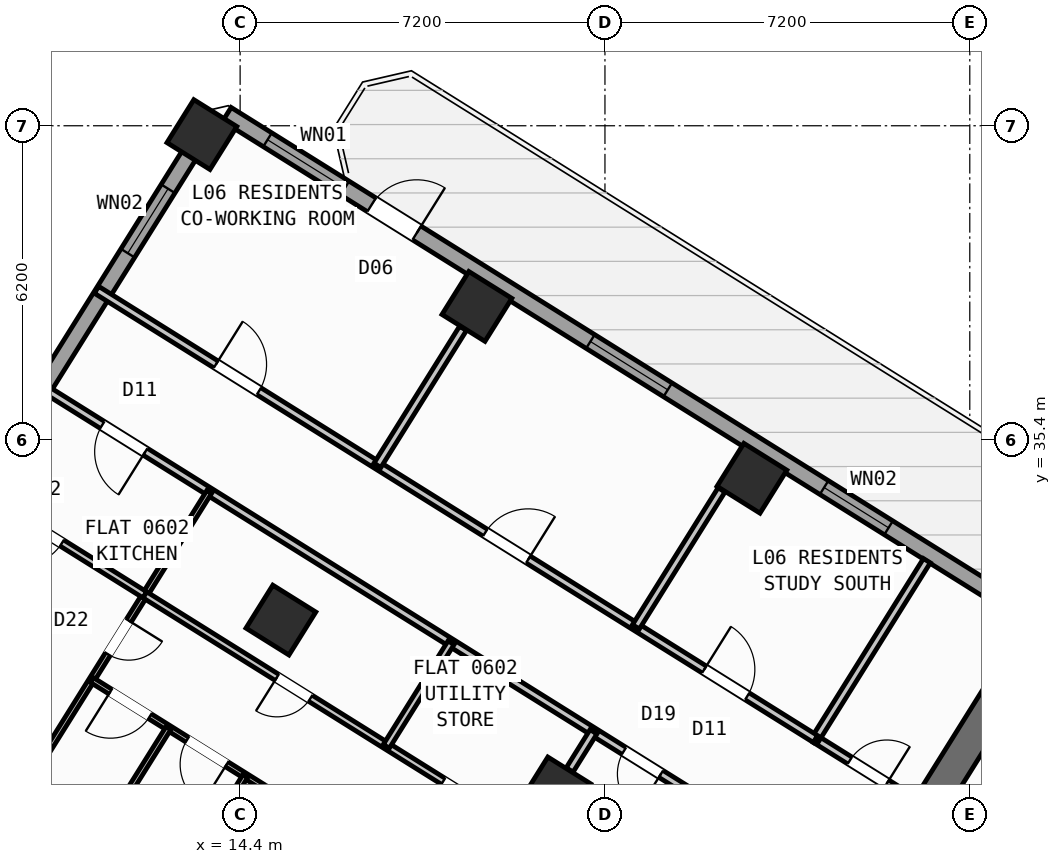
"""IFC4 building model, lengths in metres.
Left out: names, types, materials, properties, quantities, classifications, styles, units other than length and angle.
Written with IfcOpenShell. Run it as: python <this file> out.ifc"""

import sys

from ifc_helpers import new_model, si_unit, direction, frame, frame_2d, origin, origin_2d, place, context, subcontext, project, spatial, rectangle, hollow_rectangle, extrude, source, transform, mapped, element, fill, save


model = new_model("IFC4")
c1 = context("Model", 3, precision=1e-05, world=origin(), true_north=direction((0.0, 1.0)))
c2 = subcontext(c1, "Body", "Model", "MODEL_VIEW")
j1 = project(units=[si_unit("LENGTHUNIT", "METRE"), si_unit("PLANEANGLEUNIT", "RADIAN")], contexts=[c1])
p1 = place(None, origin())
s1 = spatial("IfcSite", under=j1, at=p1, CompositionType="ELEMENT")
p2 = place(p1, origin())
s2 = spatial("IfcBuilding", under=s1, at=p2, CompositionType="ELEMENT")
p3 = place(p2, frame((0.0, 0.0, 27.6)))
s3 = spatial("IfcBuildingStorey", under=s2, at=p3, CompositionType="ELEMENT", Elevation=27.6)
p4 = place(p3, frame((29.491, 30.552, 0.0), z_axis=(0.0, 0.0, 1.0), x_axis=(-0.529893103397, -0.8480644427, 0.0)))
e1 = element("IfcWall", 1, at=p4, inside=s3, PredefinedType="SHEAR", context=c2, shape_type="SweptSolid", body=[
    extrude(rectangle(XDim=3.525, YDim=0.65, at=frame_2d((1.763, 0.0))), origin(), (0.0, 0.0, 1.0), 3.35),
])
m1 = source(origin(), c2, "Body", "SweptSolid", [
    extrude(hollow_rectangle(XDim=1.0, YDim=1.0, WallThickness=0.04, at=origin_2d()), origin(), (0.0, 0.0, 1.0), 3.6),
])
for number, where, z_axis, x_axis in (
    (2, (24.5, 34.643, 0.0), (0.0, 0.0, 1.0), (-0.848, 0.53, 0.0)),
    (3, (20.632, 28.452, 0.0), (0.0, 0.0, 1.0), (-0.848, 0.53, 0.0)),
    (4, (19.073, 38.034, 0.0), (0.0, 0.0, 1.0), (-0.848, 0.53, 0.0)),
    (5, (15.205, 31.844, 0.0), (0.0, 0.0, 1.0), (-0.848, 0.53, 0.0)),
    (6, (13.646, 41.426, 0.0), (0.0, 0.0, 1.0), (-0.848, 0.53, 0.0)),
):
    element("IfcColumn", number, at=place(p3, frame(where, z_axis=z_axis, x_axis=x_axis)), inside=s3, PredefinedType="COLUMN", context=c2, shape_type="MappedRepresentation", body=[
        mapped(m1, transform((0.0, 0.0, 0.0), scale=1.0)),
    ])
p5 = place(p3, frame((2.415, 23.452, 0.0), z_axis=(0.0, 0.0, 1.0), x_axis=(0.52991049553, 0.848053575387, 0.0)))
e7 = element("IfcWall", 7, at=p5, inside=s3, PredefinedType="STANDARD", context=c2, shape_type="SweptSolid", body=[
    extrude(rectangle(XDim=21.587, YDim=0.32, at=frame_2d((10.794, 0.0))), origin(), (0.0, 0.0, 1.0), 2.725),
])
p6 = place(p5, frame((2.356, 0.0, 0.8)))
e8 = element("IfcOpeningElement", 8, at=p6, cuts=e7, PredefinedType="OPENING", context=c2, shape_type="SweptSolid", body=[
    extrude(rectangle(XDim=2.1, YDim=1.55, at=frame_2d((1.05, 0.775))), frame((0.0, 0.17, 0.0), z_axis=(0.0, -1.0, 0.0), x_axis=(1.0, 0.0, 0.0)), (0.0, 0.0, 1.0), 0.34),
])
p7 = place(p5, frame((9.009, 0.0, 0.85)))
e9 = element("IfcOpeningElement", 9, at=p7, cuts=e7, PredefinedType="OPENING", context=c2, shape_type="SweptSolid", body=[
    extrude(rectangle(XDim=1.8, YDim=1.5, at=frame_2d((0.9, 0.75))), frame((0.0, 0.17, 0.0), z_axis=(0.0, -1.0, 0.0), x_axis=(1.0, 0.0, 0.0)), (0.0, 0.0, 1.0), 0.34),
])
p8 = place(p5, frame((18.434, 0.0, 0.85)))
e10 = element("IfcOpeningElement", 10, at=p8, cuts=e7, PredefinedType="OPENING", context=c2, shape_type="SweptSolid", body=[
    extrude(rectangle(XDim=1.5, YDim=1.5, at=frame_2d((0.75, 0.75))), frame((0.0, 0.17, 0.0), z_axis=(0.0, -1.0, 0.0), x_axis=(1.0, 0.0, 0.0)), (0.0, 0.0, 1.0), 0.34),
])
p9 = place(p3, frame((14.138, 41.825, 0.0), z_axis=(0.0, 0.0, 1.0), x_axis=(0.848046498049, -0.529921821731, 0.0)))
e11 = element("IfcWall", 11, at=p9, inside=s3, PredefinedType="STANDARD", context=c2, shape_type="SweptSolid", body=[
    extrude(rectangle(XDim=31.588, YDim=0.32, at=frame_2d((15.794, 0.0))), origin(), (0.0, 0.0, 1.0), 3.35),
])
p10 = place(p9, frame((3.369, 0.0, 0.0)))
e12 = element("IfcOpeningElement", 12, at=p10, cuts=e11, PredefinedType="OPENING", context=c2, shape_type="SweptSolid", body=[
    extrude(rectangle(XDim=1.05, YDim=2.15, at=frame_2d((0.525, 1.075))), frame((0.0, 0.17, 0.0), z_axis=(0.0, -1.0, 0.0), x_axis=(1.0, 0.0, 0.0)), (0.0, 0.0, 1.0), 0.34),
])
p11 = place(p9, frame((0.946, 0.0, 0.85)))
e13 = element("IfcOpeningElement", 13, at=p11, cuts=e11, PredefinedType="OPENING", context=c2, shape_type="SweptSolid", body=[
    extrude(rectangle(XDim=1.8, YDim=1.5, at=frame_2d((0.9, 0.75))), frame((0.0, 0.17, 0.0), z_axis=(0.0, -1.0, 0.0), x_axis=(1.0, 0.0, 0.0)), (0.0, 0.0, 1.0), 0.34),
])
p12 = place(p9, frame((8.46, 0.0, 0.85)))
e14 = element("IfcOpeningElement", 14, at=p12, cuts=e11, PredefinedType="OPENING", context=c2, shape_type="SweptSolid", body=[
    extrude(rectangle(XDim=1.8, YDim=1.5, at=frame_2d((0.9, 0.75))), frame((0.0, 0.17, 0.0), z_axis=(0.0, -1.0, 0.0), x_axis=(1.0, 0.0, 0.0)), (0.0, 0.0, 1.0), 0.34),
])
p13 = place(p9, frame((13.899, 0.0, 0.85)))
e15 = element("IfcOpeningElement", 15, at=p13, cuts=e11, PredefinedType="OPENING", context=c2, shape_type="SweptSolid", body=[
    extrude(rectangle(XDim=1.5, YDim=1.5, at=frame_2d((0.75, 0.75))), frame((0.0, 0.17, 0.0), z_axis=(0.0, -1.0, 0.0), x_axis=(1.0, 0.0, 0.0)), (0.0, 0.0, 1.0), 0.34),
])
p14 = place(p9, frame((22.019, 0.0, 0.95)))
e16 = element("IfcOpeningElement", 16, at=p14, cuts=e11, PredefinedType="OPENING", context=c2, shape_type="SweptSolid", body=[
    extrude(rectangle(XDim=1.2, YDim=1.4, at=frame_2d((0.6, 0.7))), frame((0.0, 0.17, 0.0), z_axis=(0.0, -1.0, 0.0), x_axis=(1.0, 0.0, 0.0)), (0.0, 0.0, 1.0), 0.34),
])
p15 = place(p9, frame((27.569, 0.0, 0.95)))
e17 = element("IfcOpeningElement", 17, at=p15, cuts=e11, PredefinedType="OPENING", context=c2, shape_type="SweptSolid", body=[
    extrude(rectangle(XDim=1.2, YDim=1.4, at=frame_2d((0.6, 0.7))), frame((0.0, 0.17, 0.0), z_axis=(0.0, -1.0, 0.0), x_axis=(1.0, 0.0, 0.0)), (0.0, 0.0, 1.0), 0.34),
])
p16 = place(p3, frame((27.669, 28.3, 0.0), z_axis=(0.0, 0.0, 1.0), x_axis=(-0.848040823168, 0.52993090327, 0.0)))
e18 = element("IfcWall", 18, at=p16, inside=s3, PredefinedType="PARTITIONING", context=c2, shape_type="SweptSolid", body=[
    extrude(rectangle(XDim=2.258, YDim=0.16, at=frame_2d((1.129, 0.0))), origin(), (0.0, 0.0, 1.0), 3.34),
])
p17 = place(p16, frame((0.598, 0.0, 0.0)))
e19 = element("IfcOpeningElement", 19, at=p17, cuts=e18, PredefinedType="OPENING", context=c2, shape_type="SweptSolid", body=[
    extrude(rectangle(XDim=0.86, YDim=2.05, at=frame_2d((0.43, 1.025))), frame((0.0, 0.09, 0.0), z_axis=(0.0, -1.0, 0.0), x_axis=(1.0, 0.0, 0.0)), (0.0, 0.0, 1.0), 0.18),
])
p18 = place(p3, frame((27.953, 33.016, 0.0), z_axis=(0.0, 0.0, 1.0), x_axis=(-0.529872022255, -0.848077614391, 0.0)))
e20 = element("IfcWall", 20, at=p18, inside=s3, PredefinedType="PARTITIONING", context=c2, shape_type="SweptSolid", body=[
    extrude(rectangle(XDim=4.15, YDim=0.16, at=frame_2d((2.075, 0.0))), origin(), (0.0, 0.0, 1.0), 3.34),
])
p19 = place(p3, frame((25.754, 29.497, 0.0), z_axis=(0.0, 0.0, 1.0), x_axis=(-0.848045850158, 0.529922858565, 0.0)))
e21 = element("IfcWall", 21, at=p19, inside=s3, PredefinedType="PARTITIONING", context=c2, shape_type="SweptSolid", body=[
    extrude(rectangle(XDim=16.73, YDim=0.16, at=frame_2d((8.365, 0.0))), origin(), (0.0, 0.0, 1.0), 3.34),
])
p20 = place(p19, frame((1.588, 0.0, 0.0)))
e22 = element("IfcOpeningElement", 22, at=p20, cuts=e21, PredefinedType="OPENING", context=c2, shape_type="SweptSolid", body=[
    extrude(rectangle(XDim=1.0, YDim=2.1, at=frame_2d((0.5, 1.05))), frame((0.0, 0.09, 0.0), z_axis=(0.0, -1.0, 0.0), x_axis=(1.0, 0.0, 0.0)), (0.0, 0.0, 1.0), 0.18),
])
p21 = place(p19, frame((6.685, 0.0, 0.0)))
e23 = element("IfcOpeningElement", 23, at=p21, cuts=e21, PredefinedType="OPENING", context=c2, shape_type="SweptSolid", body=[
    extrude(rectangle(XDim=1.0, YDim=2.1, at=frame_2d((0.5, 1.05))), frame((0.0, 0.09, 0.0), z_axis=(0.0, -1.0, 0.0), x_axis=(1.0, 0.0, 0.0)), (0.0, 0.0, 1.0), 0.18),
])
p22 = place(p19, frame((12.951, 0.0, 0.0)))
e24 = element("IfcOpeningElement", 24, at=p22, cuts=e21, PredefinedType="OPENING", context=c2, shape_type="SweptSolid", body=[
    extrude(rectangle(XDim=1.0, YDim=2.1, at=frame_2d((0.5, 1.05))), frame((0.0, 0.09, 0.0), z_axis=(0.0, -1.0, 0.0), x_axis=(1.0, 0.0, 0.0)), (0.0, 0.0, 1.0), 0.18),
])
p23 = place(p3, frame((24.588, 27.631, 0.0), z_axis=(0.0, 0.0, 1.0), x_axis=(-0.848041752158, 0.529929416617, 0.0)))
e25 = element("IfcWall", 25, at=p23, inside=s3, PredefinedType="PARTITIONING", context=c2, shape_type="SweptSolid", body=[
    extrude(rectangle(XDim=16.73, YDim=0.16, at=frame_2d((8.365, 0.0))), origin(), (0.0, 0.0, 1.0), 3.34),
])
p24 = place(p23, frame((2.22, 0.0, 0.0)))
e26 = element("IfcOpeningElement", 26, at=p24, cuts=e25, PredefinedType="OPENING", context=c2, shape_type="SweptSolid", body=[
    extrude(rectangle(XDim=0.86, YDim=2.05, at=frame_2d((0.43, 1.025))), frame((0.0, 0.09, 0.0), z_axis=(0.0, -1.0, 0.0), x_axis=(1.0, 0.0, 0.0)), (0.0, 0.0, 1.0), 0.18),
])
p25 = place(p23, frame((14.22, 0.0, 0.0)))
e27 = element("IfcOpeningElement", 27, at=p25, cuts=e25, PredefinedType="OPENING", context=c2, shape_type="SweptSolid", body=[
    extrude(rectangle(XDim=1.0, YDim=2.1, at=frame_2d((0.5, 1.05))), frame((0.0, 0.09, 0.0), z_axis=(0.0, -1.0, 0.0), x_axis=(1.0, 0.0, 0.0)), (0.0, 0.0, 1.0), 0.18),
])
p26 = place(p3, frame((21.374, 29.639, 0.0), z_axis=(0.0, 0.0, 1.0), x_axis=(-0.529974231203, -0.848013746505, 0.0)))
e28 = element("IfcWall", 28, at=p26, inside=s3, PredefinedType="PARTITIONING", context=c2, shape_type="SweptSolid", body=[
    extrude(rectangle(XDim=0.888, YDim=0.16, at=frame_2d((0.444, 0.0))), origin(), (0.0, 0.0, 1.0), 2.725),
])
p27 = place(p3, frame((13.792, 34.377, 0.0), z_axis=(0.0, 0.0, 1.0), x_axis=(-0.529924475241, -0.848044839935, 0.0)))
e29 = element("IfcWall", 29, at=p27, inside=s3, PredefinedType="PARTITIONING", context=c2, shape_type="SweptSolid", body=[
    extrude(rectangle(XDim=15.62, YDim=0.11, at=frame_2d((7.81, 0.0))), origin(), (0.0, 0.0, 1.0), 3.34),
])
p28 = place(p27, frame((3.0, 0.0, 0.0)))
e30 = element("IfcOpeningElement", 30, at=p28, cuts=e29, PredefinedType="OPENING", context=c2, shape_type="SweptSolid", body=[
    extrude(rectangle(XDim=0.78, YDim=2.05, at=frame_2d((0.39, 1.025))), frame((0.0, 0.065, 0.0), z_axis=(0.0, -1.0, 0.0), x_axis=(1.0, 0.0, 0.0)), (0.0, 0.0, 1.0), 0.13),
])
p29 = place(p3, frame((12.521, 32.342, 0.0), z_axis=(0.0, 0.0, 1.0), x_axis=(-0.848043100782, 0.52992725842, 0.0)))
e31 = element("IfcWall", 31, at=p29, inside=s3, PredefinedType="PLUMBINGWALL", context=c2, shape_type="SweptSolid", body=[
    extrude(rectangle(XDim=3.98, YDim=0.14, at=frame_2d((1.99, 0.0))), origin(), (0.0, 0.0, 1.0), 3.34),
])
p30 = place(p29, frame((1.93, 0.0, 0.0)))
e32 = element("IfcOpeningElement", 32, at=p30, cuts=e31, PredefinedType="OPENING", context=c2, shape_type="SweptSolid", body=[
    extrude(rectangle(XDim=0.92, YDim=2.08, at=frame_2d((0.46, 1.04))), frame((0.0, 0.08, 0.0), z_axis=(0.0, -1.0, 0.0), x_axis=(1.0, 0.0, 0.0)), (0.0, 0.0, 1.0), 0.16),
])
p31 = place(p3, frame((20.102, 27.604, 0.0), z_axis=(0.0, 0.0, 1.0), x_axis=(-0.848044326704, 0.52992529657, 0.0)))
e33 = element("IfcWall", 33, at=p31, inside=s3, PredefinedType="PLUMBINGWALL", context=c2, shape_type="SweptSolid", body=[
    extrude(rectangle(XDim=8.94, YDim=0.14, at=frame_2d((4.47, 0.0))), origin(), (0.0, 0.0, 1.0), 3.34),
])
p32 = place(p31, frame((5.087, 0.0, 0.0)))
e34 = element("IfcOpeningElement", 34, at=p32, cuts=e33, PredefinedType="OPENING", context=c2, shape_type="SweptSolid", body=[
    extrude(rectangle(XDim=0.78, YDim=2.05, at=frame_2d((0.39, 1.025))), frame((0.0, 0.08, 0.0), z_axis=(0.0, -1.0, 0.0), x_axis=(1.0, 0.0, 0.0)), (0.0, 0.0, 1.0), 0.16),
])
p33 = place(p31, frame((1.218, 0.0, 0.0)))
e35 = element("IfcOpeningElement", 35, at=p33, cuts=e33, PredefinedType="OPENING", context=c2, shape_type="SweptSolid", body=[
    extrude(rectangle(XDim=0.78, YDim=2.05, at=frame_2d((0.39, 1.025))), frame((0.0, 0.08, 0.0), z_axis=(0.0, -1.0, 0.0), x_axis=(1.0, 0.0, 0.0)), (0.0, 0.0, 1.0), 0.16),
])
p34 = place(p3, frame((18.563, 31.396, 0.0), z_axis=(0.0, 0.0, 1.0), x_axis=(-0.530008045701, -0.847992612876, 0.0)))
e36 = element("IfcWall", 36, at=p34, inside=s3, PredefinedType="PLUMBINGWALL", context=c2, shape_type="SweptSolid", body=[
    extrude(rectangle(XDim=2.41, YDim=0.14, at=frame_2d((1.205, 0.0))), origin(), (0.0, 0.0, 1.0), 3.34),
])
p35 = place(p3, frame((19.053, 25.925, 0.0), z_axis=(0.0, 0.0, 1.0), x_axis=(-0.848051995289, 0.529913024266, 0.0)))
e37 = element("IfcWall", 37, at=p35, inside=s3, PredefinedType="PARTITIONING", context=c2, shape_type="SweptSolid", body=[
    extrude(rectangle(XDim=8.94, YDim=0.11, at=frame_2d((4.47, 0.0))), origin(), (0.0, 0.0, 1.0), 3.34),
])
p36 = place(p35, frame((0.434, 0.0, 0.0)))
e38 = element("IfcOpeningElement", 38, at=p36, cuts=e37, PredefinedType="OPENING", context=c2, shape_type="SweptSolid", body=[
    extrude(rectangle(XDim=0.92, YDim=2.08, at=frame_2d((0.46, 1.04))), frame((0.0, 0.065, 0.0), z_axis=(0.0, -1.0, 0.0), x_axis=(1.0, 0.0, 0.0)), (0.0, 0.0, 1.0), 0.13),
])
p37 = place(p35, frame((2.222, 0.0, 0.0)))
e39 = element("IfcOpeningElement", 39, at=p37, cuts=e37, PredefinedType="OPENING", context=c2, shape_type="SweptSolid", body=[
    extrude(rectangle(XDim=0.92, YDim=2.08, at=frame_2d((0.46, 1.04))), frame((0.0, 0.065, 0.0), z_axis=(0.0, -1.0, 0.0), x_axis=(1.0, 0.0, 0.0)), (0.0, 0.0, 1.0), 0.13),
])
p38 = place(p35, frame((4.01, 0.0, 0.0)))
e40 = element("IfcOpeningElement", 40, at=p38, cuts=e37, PredefinedType="OPENING", context=c2, shape_type="SweptSolid", body=[
    extrude(rectangle(XDim=0.92, YDim=2.08, at=frame_2d((0.46, 1.04))), frame((0.0, 0.065, 0.0), z_axis=(0.0, -1.0, 0.0), x_axis=(1.0, 0.0, 0.0)), (0.0, 0.0, 1.0), 0.13),
])
p39 = place(p35, frame((5.798, 0.0, 0.0)))
e41 = element("IfcOpeningElement", 41, at=p39, cuts=e37, PredefinedType="OPENING", context=c2, shape_type="SweptSolid", body=[
    extrude(rectangle(XDim=0.92, YDim=2.08, at=frame_2d((0.46, 1.04))), frame((0.0, 0.065, 0.0), z_axis=(0.0, -1.0, 0.0), x_axis=(1.0, 0.0, 0.0)), (0.0, 0.0, 1.0), 0.13),
])
p40 = place(p35, frame((7.586, 0.0, 0.0)))
e42 = element("IfcOpeningElement", 42, at=p40, cuts=e37, PredefinedType="OPENING", context=c2, shape_type="SweptSolid", body=[
    extrude(rectangle(XDim=0.92, YDim=2.08, at=frame_2d((0.46, 1.04))), frame((0.0, 0.065, 0.0), z_axis=(0.0, -1.0, 0.0), x_axis=(1.0, 0.0, 0.0)), (0.0, 0.0, 1.0), 0.13),
])
for number, where, z_axis, x_axis in (
    (43, (14.504, 28.767, 0.0), (0.0, 0.0, 1.0), (-0.53, -0.848, 0.0)),
    (44, (12.988, 29.715, 0.0), (0.0, 0.0, 1.0), (-0.53, -0.848, 0.0)),
):
    element("IfcWall", number, at=place(p3, frame(where, z_axis=z_axis, x_axis=x_axis)), inside=s3, PredefinedType="PARTITIONING", context=c2, shape_type="SweptSolid", body=[
        extrude(rectangle(XDim=11.24, YDim=0.11, at=frame_2d((5.62, 0.0))), origin(), (0.0, 0.0, 1.0), 3.34),
    ])
p41 = place(p3, frame((23.901, 34.414, 0.0), z_axis=(0.0, 0.0, 1.0), x_axis=(-0.529930102756, -0.848041323399, 0.0)))
e45 = element("IfcWall", 45, at=p41, inside=s3, PredefinedType="PARTITIONING", context=c2, shape_type="SweptSolid", body=[
    extrude(rectangle(XDim=3.188, YDim=0.16, at=frame_2d((1.594, 0.0))), origin(), (0.0, 0.0, 1.0), 3.34),
])
p42 = place(p3, frame((18.799, 37.602, 0.0), z_axis=(0.0, 0.0, 1.0), x_axis=(-0.529930102756, -0.848041323399, 0.0)))
e46 = element("IfcWall", 46, at=p42, inside=s3, PredefinedType="PARTITIONING", context=c2, shape_type="SweptSolid", body=[
    extrude(rectangle(XDim=3.188, YDim=0.16, at=frame_2d((1.594, 0.0))), origin(), (0.0, 0.0, 1.0), 2.725),
])
m2 = source(origin(), c2, "Body", "SweptSolid", [
    extrude(rectangle(XDim=1.05, YDim=2.15, at=frame_2d((0.525, 1.075))), frame((0.0, 0.025, 0.0), z_axis=(0.0, -1.0, 0.0), x_axis=(1.0, 0.0, 0.0)), (0.0, 0.0, 1.0), 0.05),
])
p43 = place(p10, origin())
e47 = element("IfcDoor", 47, at=p43, inside=s3, OperationType="SINGLE_SWING_RIGHT", PredefinedType="DOOR", context=c2, shape_type="MappedRepresentation", body=[
    mapped(m2, transform((0.0, 0.0, 0.0), scale=1.0)),
])
fill(e12, e47)
m3 = source(origin(), c2, "Body", "SweptSolid", [
    extrude(rectangle(XDim=1.5, YDim=1.5, at=frame_2d((0.75, 0.75))), frame((0.0, 0.03, 0.0), z_axis=(0.0, -1.0, 0.0), x_axis=(1.0, 0.0, 0.0)), (0.0, 0.0, 1.0), 0.06),
])
p44 = place(p8, origin())
e48 = element("IfcWindow", 48, at=p44, inside=s3, PartitioningType="SINGLE_PANEL", PredefinedType="WINDOW", context=c2, shape_type="MappedRepresentation", body=[
    mapped(m3, transform((0.0, 0.0, 0.0), scale=1.0)),
])
fill(e10, e48)
m4 = source(origin(), c2, "Body", "SweptSolid", [
    extrude(rectangle(XDim=1.8, YDim=1.5, at=frame_2d((0.9, 0.75))), frame((0.0, 0.03, 0.0), z_axis=(0.0, -1.0, 0.0), x_axis=(1.0, 0.0, 0.0)), (0.0, 0.0, 1.0), 0.06),
])
p45 = place(p11, origin())
e49 = element("IfcWindow", 49, at=p45, inside=s3, PartitioningType="SINGLE_PANEL", PredefinedType="WINDOW", context=c2, shape_type="MappedRepresentation", body=[
    mapped(m4, transform((0.0, 0.0, 0.0), scale=1.0)),
])
fill(e13, e49)
p46 = place(p12, origin())
e50 = element("IfcWindow", 50, at=p46, inside=s3, PartitioningType="SINGLE_PANEL", PredefinedType="WINDOW", context=c2, shape_type="MappedRepresentation", body=[
    mapped(m4, transform((0.0, 0.0, 0.0), scale=1.0)),
])
fill(e14, e50)
p47 = place(p13, origin())
e51 = element("IfcWindow", 51, at=p47, inside=s3, PartitioningType="SINGLE_PANEL", PredefinedType="WINDOW", context=c2, shape_type="MappedRepresentation", body=[
    mapped(m3, transform((0.0, 0.0, 0.0), scale=1.0)),
])
fill(e15, e51)
m5 = source(origin(), c2, "Body", "SweptSolid", [
    extrude(rectangle(XDim=0.86, YDim=2.05, at=frame_2d((0.43, 1.025))), frame((0.0, 0.025, 0.0), z_axis=(0.0, -1.0, 0.0), x_axis=(1.0, 0.0, 0.0)), (0.0, 0.0, 1.0), 0.05),
])
p48 = place(p17, frame((0.86, 0.0, 0.0), z_axis=(0.0, 0.0, 1.0), x_axis=(-1.0, 0.0, 0.0)))
e52 = element("IfcDoor", 52, at=p48, inside=s3, OperationType="SINGLE_SWING_RIGHT", PredefinedType="DOOR", context=c2, shape_type="MappedRepresentation", body=[
    mapped(m5, transform((0.0, 0.0, 0.0), scale=1.0)),
])
fill(e19, e52)
p49 = place(p24, origin())
e53 = element("IfcDoor", 53, at=p49, inside=s3, OperationType="SINGLE_SWING_LEFT", PredefinedType="DOOR", context=c2, shape_type="MappedRepresentation", body=[
    mapped(m5, transform((0.0, 0.0, 0.0), scale=1.0)),
])
fill(e26, e53)
m6 = source(origin(), c2, "Body", "SweptSolid", [
    extrude(rectangle(XDim=1.0, YDim=2.1, at=frame_2d((0.5, 1.05))), frame((0.0, 0.025, 0.0), z_axis=(0.0, -1.0, 0.0), x_axis=(1.0, 0.0, 0.0)), (0.0, 0.0, 1.0), 0.05),
])
p50 = place(p25, origin())
e54 = element("IfcDoor", 54, at=p50, inside=s3, OperationType="SINGLE_SWING_LEFT", PredefinedType="DOOR", context=c2, shape_type="MappedRepresentation", body=[
    mapped(m6, transform((0.0, 0.0, 0.0), scale=1.0)),
])
fill(e27, e54)
m7 = source(origin(), c2, "Body", "SweptSolid", [
    extrude(rectangle(XDim=0.92, YDim=2.08, at=frame_2d((0.46, 1.04))), frame((0.0, 0.025, 0.0), z_axis=(0.0, -1.0, 0.0), x_axis=(1.0, 0.0, 0.0)), (0.0, 0.0, 1.0), 0.05),
])
p51 = place(p30, origin())
e55 = element("IfcDoor", 55, at=p51, inside=s3, OperationType="SINGLE_SWING_RIGHT", PredefinedType="DOOR", context=c2, shape_type="MappedRepresentation", body=[
    mapped(m7, transform((0.0, 0.0, 0.0), scale=1.0)),
])
fill(e32, e55)
m8 = source(origin(), c2, "Body", "SweptSolid", [
    extrude(rectangle(XDim=0.78, YDim=2.05, at=frame_2d((0.39, 1.025))), frame((0.0, 0.025, 0.0), z_axis=(0.0, -1.0, 0.0), x_axis=(1.0, 0.0, 0.0)), (0.0, 0.0, 1.0), 0.05),
])
p52 = place(p28, origin())
e56 = element("IfcDoor", 56, at=p52, inside=s3, OperationType="SINGLE_SWING_LEFT", PredefinedType="DOOR", context=c2, shape_type="MappedRepresentation", body=[
    mapped(m8, transform((0.0, 0.0, 0.0), scale=1.0)),
])
fill(e30, e56)
p53 = place(p32, origin())
e57 = element("IfcDoor", 57, at=p53, inside=s3, OperationType="SINGLE_SWING_RIGHT", PredefinedType="DOOR", context=c2, shape_type="MappedRepresentation", body=[
    mapped(m8, transform((0.0, 0.0, 0.0), scale=1.0)),
])
fill(e34, e57)
p54 = place(p33, origin())
e58 = element("IfcDoor", 58, at=p54, inside=s3, OperationType="SINGLE_SWING_LEFT", PredefinedType="DOOR", context=c2, shape_type="MappedRepresentation", body=[
    mapped(m8, transform((0.0, 0.0, 0.0), scale=1.0)),
])
fill(e35, e58)
p55 = place(p39, origin())
e59 = element("IfcDoor", 59, at=p55, inside=s3, OperationType="SINGLE_SWING_LEFT", PredefinedType="DOOR", context=c2, shape_type="MappedRepresentation", body=[
    mapped(m7, transform((0.0, 0.0, 0.0), scale=1.0)),
])
fill(e41, e59)
p56 = place(p40, origin())
e60 = element("IfcDoor", 60, at=p56, inside=s3, OperationType="SINGLE_SWING_RIGHT", PredefinedType="DOOR", context=c2, shape_type="MappedRepresentation", body=[
    mapped(m7, transform((0.0, 0.0, 0.0), scale=1.0)),
])
fill(e42, e60)
p57 = place(p20, frame((1.0, 0.0, 0.0), z_axis=(0.0, 0.0, 1.0), x_axis=(-1.0, 0.0, 0.0)))
e61 = element("IfcDoor", 61, at=p57, inside=s3, OperationType="SINGLE_SWING_LEFT", PredefinedType="DOOR", context=c2, shape_type="MappedRepresentation", body=[
    mapped(m6, transform((0.0, 0.0, 0.0), scale=1.0)),
])
fill(e22, e61)
p58 = place(p21, frame((1.0, 0.0, 0.0), z_axis=(0.0, 0.0, 1.0), x_axis=(-1.0, 0.0, 0.0)))
e62 = element("IfcDoor", 62, at=p58, inside=s3, OperationType="SINGLE_SWING_RIGHT", PredefinedType="DOOR", context=c2, shape_type="MappedRepresentation", body=[
    mapped(m6, transform((0.0, 0.0, 0.0), scale=1.0)),
])
fill(e23, e62)
p59 = place(p22, frame((1.0, 0.0, 0.0), z_axis=(0.0, 0.0, 1.0), x_axis=(-1.0, 0.0, 0.0)))
e63 = element("IfcDoor", 63, at=p59, inside=s3, OperationType="SINGLE_SWING_LEFT", PredefinedType="DOOR", context=c2, shape_type="MappedRepresentation", body=[
    mapped(m6, transform((0.0, 0.0, 0.0), scale=1.0)),
])
fill(e24, e63)
save(model, sys.argv[1])
